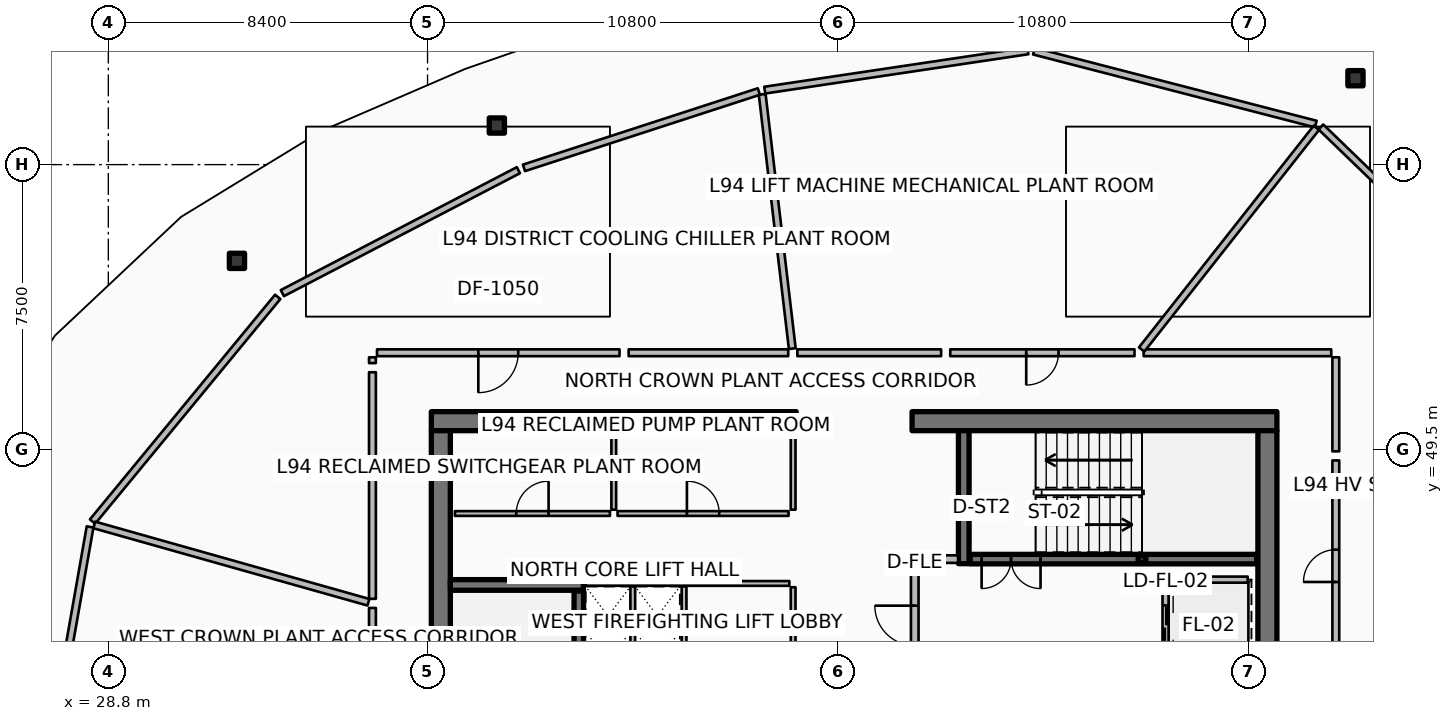
"""IFC4 building model, lengths in metres.
Left out: names, types, materials, properties, quantities, classifications, styles, units other than length and angle.
Written with IfcOpenShell. Run it as: python <this file> out.ifc"""

import sys

from ifc_helpers import new_model, si_unit, direction, frame, frame_2d, origin, origin_2d, place, context, subcontext, project, spatial, rectangle, hollow_rectangle, extrude, element, fill, save


model = new_model("IFC4")
c1 = context("Model", 3, precision=1e-05, world=origin(), true_north=direction((0.0, 1.0)))
c2 = subcontext(c1, "Body", "Model", "MODEL_VIEW")
j1 = project(units=[si_unit("LENGTHUNIT", "METRE"), si_unit("PLANEANGLEUNIT", "RADIAN")], contexts=[c1])
p1 = place(None, origin())
s1 = spatial("IfcSite", under=j1, at=p1, CompositionType="ELEMENT")
p2 = place(p1, origin())
s2 = spatial("IfcBuilding", under=s1, at=p2, CompositionType="ELEMENT")
p3 = place(p2, frame((0.0, 0.0, 374.0)))
s3 = spatial("IfcBuildingStorey", under=s2, at=p3, CompositionType="ELEMENT", Elevation=374.0)
p4 = place(p3, frame((37.3, 50.25, 0.0), z_axis=(0.0, 0.0, 1.0), x_axis=(1.0, 0.0, 0.0)))
e1 = element("IfcWall", 1, at=p4, inside=s3, PredefinedType="SHEAR", context=c2, shape_type="SweptSolid", body=[
    extrude(rectangle(XDim=9.6, YDim=0.5, at=frame_2d((4.8, 0.0))), origin(), (0.0, 0.0, 1.0), 3.6),
])
p5 = place(p3, frame((49.95, 50.25, 0.0), z_axis=(0.0, 0.0, 1.0), x_axis=(1.0, 0.0, 0.0)))
e2 = element("IfcWall", 2, at=p5, inside=s3, PredefinedType="SHEAR", context=c2, shape_type="SweptSolid", body=[
    extrude(rectangle(XDim=9.6, YDim=0.5, at=frame_2d((4.8, 0.0))), origin(), (0.0, 0.0, 1.0), 3.6),
])
for number, where, z_axis, x_axis in (
    (3, (37.55, 34.0, 0.0), (0.0, 0.0, 1.0), (0.0, 1.0, 0.0)),
    (4, (59.3, 34.0, 0.0), (0.0, 0.0, 1.0), (0.0, 1.0, 0.0)),
):
    element("IfcWall", number, at=place(p3, frame(where, z_axis=z_axis, x_axis=x_axis)), inside=s3, PredefinedType="SHEAR", context=c2, shape_type="SweptSolid", body=[
        extrude(rectangle(XDim=16.0, YDim=0.5, at=frame_2d((8.0, 0.0))), origin(), (0.0, 0.0, 1.0), 3.6),
    ])
for number, where, z_axis, x_axis in (
    (5, (37.8, 45.94, 0.0), (0.0, 0.0, 1.0), (1.0, 0.0, 0.0)),
    (6, (51.31, 46.5, 0.0), (0.0, 0.0, 1.0), (0.0, 1.0, 0.0)),
):
    element("IfcWall", number, at=place(p3, frame(where, z_axis=z_axis, x_axis=x_axis)), inside=s3, PredefinedType="SHEAR", context=c2, shape_type="SweptSolid", body=[
        extrude(rectangle(XDim=3.5, YDim=0.28, at=frame_2d((1.75, 0.0))), origin(), (0.0, 0.0, 1.0), 3.6),
    ])
p6 = place(p3, frame((56.0, 46.62, 0.0), z_axis=(0.0, 0.0, 1.0), x_axis=(1.0, 0.0, 0.0)))
e7 = element("IfcColumn", 7, at=p6, inside=s3, PredefinedType="COLUMN", context=c2, shape_type="SweptSolid", body=[
    extrude(hollow_rectangle(XDim=0.2, YDim=0.2, WallThickness=0.01, InnerFilletRadius=0.01, OuterFilletRadius=0.02, at=origin_2d()), origin(), (0.0, 0.0, 1.0), 1.595),
])
for number, where, z_axis, x_axis in (
    (8, (61.617, 59.274, 0.0), (0.0, 0.0, 1.0), (1.0, 0.0, 0.0)),
    (9, (39.023, 58.029, 0.0), (0.0, 0.0, 1.0), (1.0, 0.0, 0.0)),
    (10, (32.185, 54.468, 0.0), (0.0, 0.0, 1.0), (1.0, 0.0, 0.0)),
):
    element("IfcColumn", number, at=place(p3, frame(where, z_axis=z_axis, x_axis=x_axis)), inside=s3, PredefinedType="COLUMN", context=c2, shape_type="SweptSolid", body=[
        extrude(hollow_rectangle(XDim=0.4, YDim=0.4, WallThickness=0.02, InnerFilletRadius=0.02, OuterFilletRadius=0.04, at=origin_2d()), origin(), (0.0, 0.0, 1.0), 3.36),
    ])
p7 = place(p3, frame((41.18, 38.22, 0.0), z_axis=(0.0, 0.0, 1.0), x_axis=(0.0, 1.0, 0.0)))
e11 = element("IfcWall", 11, at=p7, inside=s3, PredefinedType="SOLIDWALL", context=c2, shape_type="SweptSolid", body=[
    extrude(rectangle(XDim=7.56, YDim=0.25, at=frame_2d((3.78, 0.0))), origin(), (0.0, 0.0, 1.0), 3.36),
])
p8 = place(p7, frame((0.3, 0.0, 0.0)))
e12 = element("IfcOpeningElement", 12, at=p8, cuts=e11, PredefinedType="OPENING", context=c2, shape_type="SweptSolid", body=[
    extrude(rectangle(XDim=1.55, YDim=2.15, at=frame_2d((0.775, 1.075))), frame((0.0, 0.135, 0.0), z_axis=(0.0, -1.0, 0.0), x_axis=(1.0, 0.0, 0.0)), (0.0, 0.0, 1.0), 0.27),
])
p9 = place(p3, frame((51.48, 46.62, 0.0), z_axis=(0.0, 0.0, 1.0), x_axis=(1.0, 0.0, 0.0)))
e13 = element("IfcWall", 13, at=p9, inside=s3, PredefinedType="SOLIDWALL", context=c2, shape_type="SweptSolid", body=[
    extrude(rectangle(XDim=7.54, YDim=0.25, at=frame_2d((3.77, 0.0))), origin(), (0.0, 0.0, 1.0), 3.36),
])
p10 = place(p9, frame((0.3, 0.0, 0.0)))
e14 = element("IfcOpeningElement", 14, at=p10, cuts=e13, PredefinedType="OPENING", context=c2, shape_type="SweptSolid", body=[
    extrude(rectangle(XDim=1.55, YDim=2.15, at=frame_2d((0.775, 1.075))), frame((0.0, 0.135, 0.0), z_axis=(0.0, -1.0, 0.0), x_axis=(1.0, 0.0, 0.0)), (0.0, 0.0, 1.0), 0.27),
])
p11 = place(p3, frame((56.62, 46.08, 0.0), z_axis=(0.0, 0.0, 1.0), x_axis=(0.0, -1.0, 0.0)))
e15 = element("IfcWall", 15, at=p11, inside=s3, PredefinedType="PARTITIONING", context=c2, shape_type="SweptSolid", body=[
    extrude(rectangle(XDim=2.46, YDim=0.16, at=frame_2d((1.23, 0.0))), origin(), (0.0, 0.0, 1.0), 3.36),
])
p12 = place(p11, frame((0.68, 0.0, 0.0)))
e16 = element("IfcOpeningElement", 16, at=p12, cuts=e15, PredefinedType="OPENING", context=c2, shape_type="SweptSolid", body=[
    extrude(rectangle(XDim=1.1, YDim=2.1, at=frame_2d((0.55, 1.05))), frame((0.0, 0.09, 0.0), z_axis=(0.0, -1.0, 0.0), x_axis=(1.0, 0.0, 0.0)), (0.0, 0.0, 1.0), 0.18),
])
p13 = place(p3, frame((56.72, 46.08, 0.0), z_axis=(0.0, 0.0, 1.0), x_axis=(1.0, 0.0, 0.0)))
e17 = element("IfcWall", 17, at=p13, inside=s3, PredefinedType="PARTITIONING", context=c2, shape_type="SweptSolid", body=[
    extrude(rectangle(XDim=2.06, YDim=0.16, at=frame_2d((1.03, 0.0))), origin(), (0.0, 0.0, 1.0), 3.36),
])
for number, where, z_axis, x_axis in (
    (18, (46.82, 47.92, 0.0), (0.0, 0.0, 1.0), (0.0, 1.0, 0.0)),
    (19, (42.1, 47.92, 0.0), (0.0, 0.0, 1.0), (0.0, 1.0, 0.0)),
):
    element("IfcWall", number, at=place(p3, frame(where, z_axis=z_axis, x_axis=x_axis)), inside=s3, PredefinedType="PARTITIONING", context=c2, shape_type="SweptSolid", body=[
        extrude(rectangle(XDim=2.03, YDim=0.125, at=frame_2d((1.015, 0.0))), origin(), (0.0, 0.0, 1.0), 2.8),
    ])
p14 = place(p3, frame((37.92, 47.82, 0.0), z_axis=(0.0, 0.0, 1.0), x_axis=(1.0, 0.0, 0.0)))
e20 = element("IfcWall", 20, at=p14, inside=s3, PredefinedType="PARTITIONING", context=c2, shape_type="SweptSolid", body=[
    extrude(rectangle(XDim=4.08, YDim=0.125, at=frame_2d((2.04, 0.0))), origin(), (0.0, 0.0, 1.0), 2.8),
])
p15 = place(p14, frame((1.615, 0.0, 0.0)))
e21 = element("IfcOpeningElement", 21, at=p15, cuts=e20, PredefinedType="OPENING", context=c2, shape_type="SweptSolid", body=[
    extrude(rectangle(XDim=0.85, YDim=2.06, at=frame_2d((0.425, 1.03))), frame((0.0, 0.073, 0.0), z_axis=(0.0, -1.0, 0.0), x_axis=(1.0, 0.0, 0.0)), (0.0, 0.0, 1.0), 0.145),
])
p16 = place(p3, frame((42.2, 47.82, 0.0), z_axis=(0.0, 0.0, 1.0), x_axis=(1.0, 0.0, 0.0)))
e22 = element("IfcWall", 22, at=p16, inside=s3, PredefinedType="PARTITIONING", context=c2, shape_type="SweptSolid", body=[
    extrude(rectangle(XDim=4.5, YDim=0.125, at=frame_2d((2.25, 0.0))), origin(), (0.0, 0.0, 1.0), 2.8),
])
p17 = place(p16, frame((1.825, 0.0, 0.0)))
e23 = element("IfcOpeningElement", 23, at=p17, cuts=e22, PredefinedType="OPENING", context=c2, shape_type="SweptSolid", body=[
    extrude(rectangle(XDim=0.85, YDim=2.06, at=frame_2d((0.425, 1.03))), frame((0.0, 0.073, 0.0), z_axis=(0.0, -1.0, 0.0), x_axis=(1.0, 0.0, 0.0)), (0.0, 0.0, 1.0), 0.145),
])
p18 = place(p3, frame((50.14, 46.62, 0.0), z_axis=(0.0, 0.0, 1.0), x_axis=(1.0, 0.0, 0.0)))
e24 = element("IfcWall", 24, at=p18, inside=s3, PredefinedType="PARTITIONING", context=c2, shape_type="SweptSolid", body=[
    extrude(rectangle(XDim=1.02, YDim=0.2, at=frame_2d((0.51, 0.0))), origin(), (0.0, 0.0, 1.0), 3.36),
])
p19 = place(p3, frame((50.02, 43.22, 0.0), z_axis=(0.0, 0.0, 1.0), x_axis=(0.0, 1.0, 0.0)))
e25 = element("IfcWall", 25, at=p19, inside=s3, PredefinedType="PARTITIONING", context=c2, shape_type="SweptSolid", body=[
    extrude(rectangle(XDim=3.3, YDim=0.2, at=frame_2d((1.65, 0.0))), origin(), (0.0, 0.0, 1.0), 3.36),
])
p20 = place(p19, frame((1.125, 0.0, 0.0)))
e26 = element("IfcOpeningElement", 26, at=p20, cuts=e25, PredefinedType="OPENING", context=c2, shape_type="SweptSolid", body=[
    extrude(rectangle(XDim=1.05, YDim=2.1, at=frame_2d((0.525, 1.05))), frame((0.0, 0.11, 0.0), z_axis=(0.0, -1.0, 0.0), x_axis=(1.0, 0.0, 0.0)), (0.0, 0.0, 1.0), 0.22),
])
p21 = place(p3, frame((41.36, 45.98, 0.0), z_axis=(0.0, 0.0, 1.0), x_axis=(1.0, 0.0, 0.0)))
e27 = element("IfcWall", 27, at=p21, inside=s3, PredefinedType="PARTITIONING", context=c2, shape_type="SweptSolid", body=[
    extrude(rectangle(XDim=5.36, YDim=0.125, at=frame_2d((2.68, 0.0))), origin(), (0.0, 0.0, 1.0), 2.8),
])
p22 = place(p3, frame((42.6, 44.35, 0.0), z_axis=(0.0, 0.0, 1.0), x_axis=(0.0, 1.0, 0.0)))
e28 = element("IfcWall", 28, at=p22, inside=s3, PredefinedType="PARTITIONING", context=c2, shape_type="SweptSolid", body=[
    extrude(rectangle(XDim=1.55, YDim=0.125, at=frame_2d((0.775, 0.0))), origin(), (0.0, 0.0, 1.0), 2.8),
])
p23 = place(p3, frame((43.95, 41.58, 0.0), z_axis=(0.0, 0.0, 1.0), x_axis=(0.0, 1.0, 0.0)))
e29 = element("IfcWall", 29, at=p23, inside=s3, PredefinedType="PARTITIONING", context=c2, shape_type="SweptSolid", body=[
    extrude(rectangle(XDim=4.32, YDim=0.125, at=frame_2d((2.16, 0.0))), origin(), (0.0, 0.0, 1.0), 2.8),
])
p24 = place(p3, frame((46.82, 41.58, 0.0), z_axis=(0.0, 0.0, 1.0), x_axis=(0.0, 1.0, 0.0)))
e30 = element("IfcWall", 30, at=p24, inside=s3, PredefinedType="PARTITIONING", context=c2, shape_type="SweptSolid", body=[
    extrude(rectangle(XDim=4.3, YDim=0.125, at=frame_2d((2.15, 0.0))), origin(), (0.0, 0.0, 1.0), 2.8),
])
p25 = place(p24, frame((1.725, 0.0, 0.0)))
e31 = element("IfcOpeningElement", 31, at=p25, cuts=e30, PredefinedType="OPENING", context=c2, shape_type="SweptSolid", body=[
    extrude(rectangle(XDim=0.85, YDim=2.06, at=frame_2d((0.425, 1.03))), frame((0.0, 0.073, 0.0), z_axis=(0.0, -1.0, 0.0), x_axis=(1.0, 0.0, 0.0)), (0.0, 0.0, 1.0), 0.145),
])
p26 = place(p3, frame((66.467, 52.43, 0.0), z_axis=(0.0, 0.0, 1.0), x_axis=(-0.719364153135, 0.694633151516, 0.0)))
e32 = element("IfcWall", 32, at=p26, inside=s3, PredefinedType="PARTITIONING", context=c2, shape_type="SweptSolid", body=[
    extrude(rectangle(XDim=8.006, YDim=0.18, at=frame_2d((4.003, 0.0))), origin(), (0.0, 0.0, 1.0), 2.8),
])
p27 = place(p3, frame((60.573, 58.066, 0.0), z_axis=(0.0, 0.0, 1.0), x_axis=(-0.968117205342, 0.250497658115, 0.0)))
e33 = element("IfcWall", 33, at=p27, inside=s3, PredefinedType="PARTITIONING", context=c2, shape_type="SweptSolid", body=[
    extrude(rectangle(XDim=7.662, YDim=0.18, at=frame_2d((3.831, 0.0))), origin(), (0.0, 0.0, 1.0), 2.8),
])
p28 = place(p3, frame((52.999, 59.994, 0.0), z_axis=(0.0, 0.0, 1.0), x_axis=(-0.989034336252, -0.147685753256, 0.0)))
e34 = element("IfcWall", 34, at=p28, inside=s3, PredefinedType="PARTITIONING", context=c2, shape_type="SweptSolid", body=[
    extrude(rectangle(XDim=7.003, YDim=0.18, at=frame_2d((3.501, 0.0))), origin(), (0.0, 0.0, 1.0), 2.8),
])
p29 = place(p3, frame((45.918, 58.923, 0.0), z_axis=(0.0, 0.0, 1.0), x_axis=(-0.95105283999, -0.309028308649, 0.0)))
e35 = element("IfcWall", 35, at=p29, inside=s3, PredefinedType="PARTITIONING", context=c2, shape_type="SweptSolid", body=[
    extrude(rectangle(XDim=6.499, YDim=0.18, at=frame_2d((3.25, 0.0))), origin(), (0.0, 0.0, 1.0), 2.8),
])
p30 = place(p3, frame((39.59, 56.853, 0.0), z_axis=(0.0, 0.0, 1.0), x_axis=(-0.886949494865, -0.461866423935, 0.0)))
e36 = element("IfcWall", 36, at=p30, inside=s3, PredefinedType="PARTITIONING", context=c2, shape_type="SweptSolid", body=[
    extrude(rectangle(XDim=7.002, YDim=0.18, at=frame_2d((3.501, 0.0))), origin(), (0.0, 0.0, 1.0), 2.8),
])
p31 = place(p3, frame((33.258, 53.52, 0.0), z_axis=(0.0, 0.0, 1.0), x_axis=(-0.636018833443, -0.771673534278, 0.0)))
e37 = element("IfcWall", 37, at=p31, inside=s3, PredefinedType="PARTITIONING", context=c2, shape_type="SweptSolid", body=[
    extrude(rectangle(XDim=7.661, YDim=0.18, at=frame_2d((3.831, 0.0))), origin(), (0.0, 0.0, 1.0), 2.8),
])
p32 = place(p3, frame((28.32, 47.468, 0.0), z_axis=(0.0, 0.0, 1.0), x_axis=(-0.173668776466, -0.984804120666, 0.0)))
e38 = element("IfcWall", 38, at=p32, inside=s3, PredefinedType="PARTITIONING", context=c2, shape_type="SweptSolid", body=[
    extrude(rectangle(XDim=8.006, YDim=0.18, at=frame_2d((4.003, 0.0))), origin(), (0.0, 0.0, 1.0), 2.8),
])
p33 = place(p3, frame((46.69, 52.05, 0.0), z_axis=(0.0, 0.0, 1.0), x_axis=(-1.0, 0.0, 0.0)))
e39 = element("IfcWall", 39, at=p33, inside=s3, PredefinedType="PARTITIONING", context=c2, shape_type="SweptSolid", body=[
    extrude(rectangle(XDim=4.199, YDim=0.18, at=frame_2d((2.099, 0.0))), origin(), (0.0, 0.0, 1.0), 2.8),
])
p34 = place(p3, frame((42.252, 52.05, 0.0), z_axis=(0.0, 0.0, 1.0), x_axis=(-1.0, 0.0, 0.0)))
e40 = element("IfcWall", 40, at=p34, inside=s3, PredefinedType="PARTITIONING", context=c2, shape_type="SweptSolid", body=[
    extrude(rectangle(XDim=6.382, YDim=0.18, at=frame_2d((3.191, 0.0))), origin(), (0.0, 0.0, 1.0), 2.8),
])
p35 = place(p34, frame((2.666, 0.0, 0.0)))
e41 = element("IfcOpeningElement", 41, at=p35, cuts=e40, PredefinedType="OPENING", context=c2, shape_type="SweptSolid", body=[
    extrude(rectangle(XDim=1.05, YDim=2.1, at=frame_2d((0.525, 1.05))), frame((0.0, 0.1, 0.0), z_axis=(0.0, -1.0, 0.0), x_axis=(1.0, 0.0, 0.0)), (0.0, 0.0, 1.0), 0.2),
])
p36 = place(p3, frame((35.75, 51.93, 0.0), z_axis=(0.0, 0.0, 1.0), x_axis=(0.0, -1.0, 0.0)))
e42 = element("IfcWall", 42, at=p36, inside=s3, PredefinedType="PARTITIONING", context=c2, shape_type="SweptSolid", body=[
    extrude(rectangle(XDim=0.153, YDim=0.18, at=frame_2d((0.076, 0.0))), origin(), (0.0, 0.0, 1.0), 2.8),
])
p37 = place(p3, frame((35.75, 51.537, 0.0), z_axis=(0.0, 0.0, 1.0), x_axis=(0.0, -1.0, 0.0)))
e43 = element("IfcWall", 43, at=p37, inside=s3, PredefinedType="PARTITIONING", context=c2, shape_type="SweptSolid", body=[
    extrude(rectangle(XDim=5.962, YDim=0.18, at=frame_2d((2.981, 0.0))), origin(), (0.0, 0.0, 1.0), 2.8),
])
p38 = place(p3, frame((46.798, 52.159, 0.0), z_axis=(0.0, 0.0, 1.0), x_axis=(-0.117541495417, 0.993067971921, 0.0)))
e44 = element("IfcWall", 44, at=p38, inside=s3, PredefinedType="PARTITIONING", context=c2, shape_type="SweptSolid", body=[
    extrude(rectangle(XDim=6.736, YDim=0.18, at=frame_2d((3.368, 0.0))), origin(), (0.0, 0.0, 1.0), 2.8),
])
p39 = place(p3, frame((35.644, 45.485, 0.0), z_axis=(0.0, 0.0, 1.0), x_axis=(-0.96245862205, 0.271428445159, 0.0)))
e45 = element("IfcWall", 45, at=p39, inside=s3, PredefinedType="PARTITIONING", context=c2, shape_type="SweptSolid", body=[
    extrude(rectangle(XDim=7.495, YDim=0.18, at=frame_2d((3.748, 0.0))), origin(), (0.0, 0.0, 1.0), 2.8),
])
p40 = place(p3, frame((35.75, 45.335, 0.0), z_axis=(0.0, 0.0, 1.0), x_axis=(0.0, -1.0, 0.0)))
e46 = element("IfcWall", 46, at=p40, inside=s3, PredefinedType="PARTITIONING", context=c2, shape_type="SweptSolid", body=[
    extrude(rectangle(XDim=4.665, YDim=0.18, at=frame_2d((2.333, 0.0))), origin(), (0.0, 0.0, 1.0), 2.8),
])
p41 = place(p3, frame((61.209, 43.563, 0.0), z_axis=(0.0, 0.0, 1.0), x_axis=(0.993070558818, 0.117519637545, 0.0)))
e47 = element("IfcWall", 47, at=p41, inside=s3, PredefinedType="PARTITIONING", context=c2, shape_type="SweptSolid", body=[
    extrude(rectangle(XDim=7.83, YDim=0.18, at=frame_2d((3.915, 0.0))), origin(), (0.0, 0.0, 1.0), 2.8),
])
p42 = place(p3, frame((61.1, 43.67, 0.0), z_axis=(0.0, 0.0, 1.0), x_axis=(0.0, 1.0, 0.0)))
e48 = element("IfcWall", 48, at=p42, inside=s3, PredefinedType="PARTITIONING", context=c2, shape_type="SweptSolid", body=[
    extrude(rectangle(XDim=5.546, YDim=0.18, at=frame_2d((2.773, 0.0))), origin(), (0.0, 0.0, 1.0), 2.8),
])
p43 = place(p42, frame((2.348, 0.0, 0.0)))
e49 = element("IfcOpeningElement", 49, at=p43, cuts=e48, PredefinedType="OPENING", context=c2, shape_type="SweptSolid", body=[
    extrude(rectangle(XDim=0.85, YDim=2.06, at=frame_2d((0.425, 1.03))), frame((0.0, 0.1, 0.0), z_axis=(0.0, -1.0, 0.0), x_axis=(1.0, 0.0, 0.0)), (0.0, 0.0, 1.0), 0.2),
])
p44 = place(p3, frame((61.1, 49.456, 0.0), z_axis=(0.0, 0.0, 1.0), x_axis=(0.0, 1.0, 0.0)))
e50 = element("IfcWall", 50, at=p44, inside=s3, PredefinedType="PARTITIONING", context=c2, shape_type="SweptSolid", body=[
    extrude(rectangle(XDim=2.474, YDim=0.18, at=frame_2d((1.237, 0.0))), origin(), (0.0, 0.0, 1.0), 2.8),
])
p45 = place(p3, frame((60.98, 52.05, 0.0), z_axis=(0.0, 0.0, 1.0), x_axis=(-1.0, 0.0, 0.0)))
e51 = element("IfcWall", 51, at=p45, inside=s3, PredefinedType="PARTITIONING", context=c2, shape_type="SweptSolid", body=[
    extrude(rectangle(XDim=4.937, YDim=0.18, at=frame_2d((2.469, 0.0))), origin(), (0.0, 0.0, 1.0), 2.8),
])
p46 = place(p3, frame((55.991, 52.136, 0.0), z_axis=(0.0, 0.0, 1.0), x_axis=(0.619089811342, 0.785320192974, 0.0)))
e52 = element("IfcWall", 52, at=p46, inside=s3, PredefinedType="PARTITIONING", context=c2, shape_type="SweptSolid", body=[
    extrude(rectangle(XDim=7.426, YDim=0.18, at=frame_2d((3.713, 0.0))), origin(), (0.0, 0.0, 1.0), 2.8),
])
p47 = place(p3, frame((55.803, 52.05, 0.0), z_axis=(0.0, 0.0, 1.0), x_axis=(-1.0, 0.0, 0.0)))
e53 = element("IfcWall", 53, at=p47, inside=s3, PredefinedType="PARTITIONING", context=c2, shape_type="SweptSolid", body=[
    extrude(rectangle(XDim=4.848, YDim=0.18, at=frame_2d((2.424, 0.0))), origin(), (0.0, 0.0, 1.0), 2.8),
])
p48 = place(p47, frame((1.999, 0.0, 0.0)))
e54 = element("IfcOpeningElement", 54, at=p48, cuts=e53, PredefinedType="OPENING", context=c2, shape_type="SweptSolid", body=[
    extrude(rectangle(XDim=0.85, YDim=2.06, at=frame_2d((0.425, 1.03))), frame((0.0, 0.1, 0.0), z_axis=(0.0, -1.0, 0.0), x_axis=(1.0, 0.0, 0.0)), (0.0, 0.0, 1.0), 0.2),
])
p49 = place(p3, frame((50.714, 52.05, 0.0), z_axis=(0.0, 0.0, 1.0), x_axis=(-1.0, 0.0, 0.0)))
e55 = element("IfcWall", 55, at=p49, inside=s3, PredefinedType="PARTITIONING", context=c2, shape_type="SweptSolid", body=[
    extrude(rectangle(XDim=3.784, YDim=0.18, at=frame_2d((1.892, 0.0))), origin(), (0.0, 0.0, 1.0), 2.8),
])
p50 = place(p10, origin())
e56 = element("IfcDoor", 56, at=p50, inside=s3, OperationType="DOUBLE_DOOR_SINGLE_SWING", PredefinedType="DOOR", context=c2, shape_type="SweptSolid", body=[
    extrude(rectangle(XDim=1.55, YDim=2.15, at=frame_2d((0.775, 1.075))), frame((0.0, 0.025, 0.0), z_axis=(0.0, -1.0, 0.0), x_axis=(1.0, 0.0, 0.0)), (0.0, 0.0, 1.0), 0.05),
])
fill(e14, e56)
p51 = place(p12, origin())
e57 = element("IfcDoor", 57, at=p51, inside=s3, OperationType="DOUBLE_DOOR_SLIDING", PredefinedType="DOOR", context=c2, shape_type="SweptSolid", body=[
    extrude(rectangle(XDim=1.1, YDim=2.1, at=frame_2d((0.55, 1.05))), frame((0.0, 0.025, 0.0), z_axis=(0.0, -1.0, 0.0), x_axis=(1.0, 0.0, 0.0)), (0.0, 0.0, 1.0), 0.05),
])
fill(e16, e57)
p52 = place(p15, origin())
e58 = element("IfcDoor", 58, at=p52, inside=s3, OperationType="SINGLE_SWING_RIGHT", PredefinedType="DOOR", context=c2, shape_type="SweptSolid", body=[
    extrude(rectangle(XDim=0.85, YDim=2.06, at=frame_2d((0.425, 1.03))), frame((0.0, 0.025, 0.0), z_axis=(0.0, -1.0, 0.0), x_axis=(1.0, 0.0, 0.0)), (0.0, 0.0, 1.0), 0.05),
])
fill(e21, e58)
p53 = place(p17, origin())
e59 = element("IfcDoor", 59, at=p53, inside=s3, OperationType="SINGLE_SWING_LEFT", PredefinedType="DOOR", context=c2, shape_type="SweptSolid", body=[
    extrude(rectangle(XDim=0.85, YDim=2.06, at=frame_2d((0.425, 1.03))), frame((0.0, 0.025, 0.0), z_axis=(0.0, -1.0, 0.0), x_axis=(1.0, 0.0, 0.0)), (0.0, 0.0, 1.0), 0.05),
])
fill(e23, e59)
p54 = place(p20, origin())
e60 = element("IfcDoor", 60, at=p54, inside=s3, OperationType="SINGLE_SWING_RIGHT", PredefinedType="DOOR", context=c2, shape_type="SweptSolid", body=[
    extrude(rectangle(XDim=1.05, YDim=2.1, at=frame_2d((0.525, 1.05))), frame((0.0, 0.025, 0.0), z_axis=(0.0, -1.0, 0.0), x_axis=(1.0, 0.0, 0.0)), (0.0, 0.0, 1.0), 0.05),
])
fill(e26, e60)
p55 = place(p35, origin())
e61 = element("IfcDoor", 61, at=p55, inside=s3, OperationType="SINGLE_SWING_RIGHT", PredefinedType="DOOR", context=c2, shape_type="SweptSolid", body=[
    extrude(rectangle(XDim=1.05, YDim=2.1, at=frame_2d((0.525, 1.05))), frame((0.0, 0.025, 0.0), z_axis=(0.0, -1.0, 0.0), x_axis=(1.0, 0.0, 0.0)), (0.0, 0.0, 1.0), 0.05),
])
fill(e41, e61)
p56 = place(p43, origin())
e62 = element("IfcDoor", 62, at=p56, inside=s3, OperationType="SINGLE_SWING_LEFT", PredefinedType="DOOR", context=c2, shape_type="SweptSolid", body=[
    extrude(rectangle(XDim=0.85, YDim=2.06, at=frame_2d((0.425, 1.03))), frame((0.0, 0.025, 0.0), z_axis=(0.0, -1.0, 0.0), x_axis=(1.0, 0.0, 0.0)), (0.0, 0.0, 1.0), 0.05),
])
fill(e49, e62)
p57 = place(p48, origin())
e63 = element("IfcDoor", 63, at=p57, inside=s3, OperationType="SINGLE_SWING_RIGHT", PredefinedType="DOOR", context=c2, shape_type="SweptSolid", body=[
    extrude(rectangle(XDim=0.85, YDim=2.06, at=frame_2d((0.425, 1.03))), frame((0.0, 0.025, 0.0), z_axis=(0.0, -1.0, 0.0), x_axis=(1.0, 0.0, 0.0)), (0.0, 0.0, 1.0), 0.05),
])
fill(e54, e63)
save(model, sys.argv[1])
